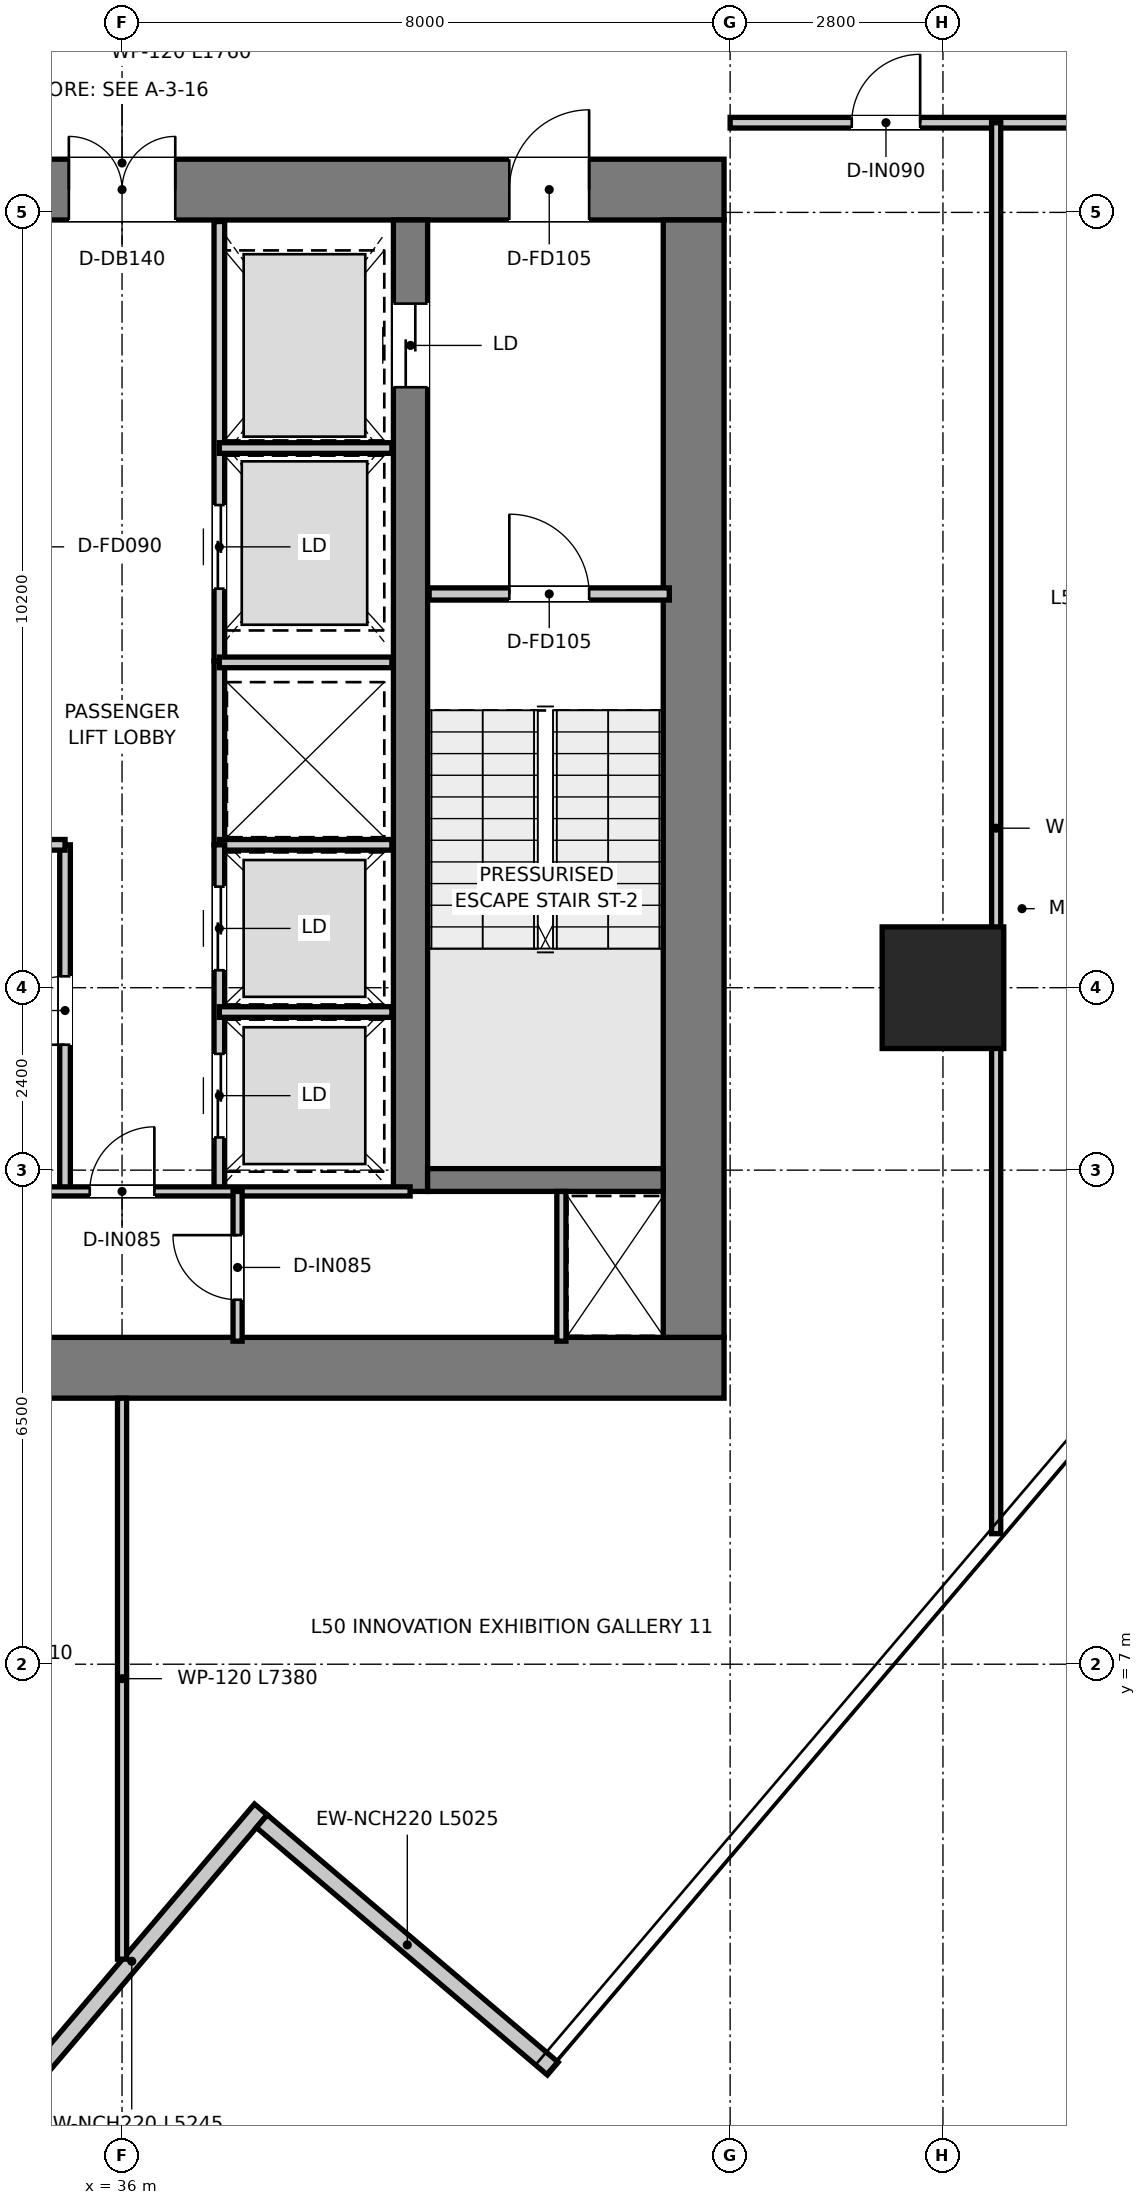
"""IFC4 building model, lengths in metres.
Left out: names, types, materials, properties, quantities, classifications, styles, units other than length and angle.
Written with IfcOpenShell. Run it as: python <this file> out.ifc"""

import sys

from ifc_helpers import new_model, si_unit, direction, frame, frame_2d, origin, origin_2d, place, context, subcontext, project, spatial, rectangle, extrude, source, transform, mapped, element, fill, save


model = new_model("IFC4")
c1 = context("Model", 3, precision=1e-05, world=origin(), true_north=direction((0.0, 1.0)))
c2 = subcontext(c1, "Body", "Model", "MODEL_VIEW")
j1 = project(units=[si_unit("LENGTHUNIT", "METRE"), si_unit("PLANEANGLEUNIT", "RADIAN")], contexts=[c1])
p1 = place(None, origin())
s1 = spatial("IfcSite", under=j1, at=p1, CompositionType="ELEMENT")
p2 = place(p1, origin())
s2 = spatial("IfcBuilding", under=s1, at=p2, CompositionType="ELEMENT")
p3 = place(p2, frame((0.0, 0.0, 207.3)))
s3 = spatial("IfcBuildingStorey", under=s2, at=p3, CompositionType="ELEMENT", Elevation=207.3)
p4 = place(p3, frame((28.08, 10.9, 0.0), z_axis=(0.0, 0.0, 1.0), x_axis=(1.0, 0.0, 0.0)))
e1 = element("IfcWall", 1, at=p4, inside=s3, PredefinedType="SHEAR", context=c2, shape_type="SweptSolid", body=[
    extrude(rectangle(XDim=15.84, YDim=0.8, at=frame_2d((7.92, 0.0))), origin(), (0.0, 0.0, 1.0), 3.95),
])
p5 = place(p3, frame((28.08, 26.4, 0.0), z_axis=(0.0, 0.0, 1.0), x_axis=(1.0, 0.0, 0.0)))
e2 = element("IfcWall", 2, at=p5, inside=s3, PredefinedType="SHEAR", context=c2, shape_type="SweptSolid", body=[
    extrude(rectangle(XDim=15.84, YDim=0.8, at=frame_2d((7.92, 0.0))), origin(), (0.0, 0.0, 1.0), 3.95),
])
p6 = place(p5, frame((7.22, 0.0, 0.0)))
e3 = element("IfcOpeningElement", 3, at=p6, cuts=e2, PredefinedType="OPENING", context=c2, shape_type="SweptSolid", body=[
    extrude(rectangle(XDim=1.4, YDim=2.2, at=frame_2d((0.7, 1.1))), frame((0.0, 0.41, 0.0), z_axis=(0.0, -1.0, 0.0), x_axis=(1.0, 0.0, 0.0)), (0.0, 0.0, 1.0), 0.82),
])
p7 = place(p5, frame((1.775, 0.0, 0.0)))
e4 = element("IfcOpeningElement", 4, at=p7, cuts=e2, PredefinedType="OPENING", context=c2, shape_type="SweptSolid", body=[
    extrude(rectangle(XDim=1.05, YDim=2.1, at=frame_2d((0.525, 1.05))), frame((0.0, 0.41, 0.0), z_axis=(0.0, -1.0, 0.0), x_axis=(1.0, 0.0, 0.0)), (0.0, 0.0, 1.0), 0.82),
])
p8 = place(p5, frame((13.015, 0.0, 0.0)))
e5 = element("IfcOpeningElement", 5, at=p8, cuts=e2, PredefinedType="OPENING", context=c2, shape_type="SweptSolid", body=[
    extrude(rectangle(XDim=1.05, YDim=2.1, at=frame_2d((0.525, 1.05))), frame((0.0, 0.41, 0.0), z_axis=(0.0, -1.0, 0.0), x_axis=(1.0, 0.0, 0.0)), (0.0, 0.0, 1.0), 0.82),
])
p9 = place(p3, frame((43.52, 11.3, 0.0), z_axis=(0.0, 0.0, 1.0), x_axis=(0.0, 1.0, 0.0)))
e6 = element("IfcWall", 6, at=p9, inside=s3, PredefinedType="SHEAR", context=c2, shape_type="SweptSolid", body=[
    extrude(rectangle(XDim=14.7, YDim=0.8, at=frame_2d((7.35, 0.0))), origin(), (0.0, 0.0, 1.0), 3.95),
])
p10 = place(p3, frame((39.795, 13.22, 0.0), z_axis=(0.0, 0.0, 1.0), x_axis=(0.0, 1.0, 0.0)))
e7 = element("IfcWall", 7, at=p10, inside=s3, PredefinedType="SHEAR", context=c2, shape_type="SweptSolid", body=[
    extrude(rectangle(XDim=12.78, YDim=0.45, at=frame_2d((6.39, 0.0))), origin(), (0.0, 0.0, 1.0), 3.95),
])
p11 = place(p10, frame((10.58, 0.0, 0.0)))
e8 = element("IfcOpeningElement", 8, at=p11, cuts=e7, PredefinedType="OPENING", context=c2, shape_type="SweptSolid", body=[
    extrude(rectangle(XDim=1.1, YDim=2.15, at=frame_2d((0.55, 1.075))), frame((0.0, 0.235, 0.0), z_axis=(0.0, -1.0, 0.0), x_axis=(1.0, 0.0, 0.0)), (0.0, 0.0, 1.0), 0.47),
])
p12 = place(p3, frame((40.02, 13.37, 0.0), z_axis=(0.0, 0.0, 1.0), x_axis=(1.0, 0.0, 0.0)))
e9 = element("IfcWall", 9, at=p12, inside=s3, PredefinedType="SHEAR", context=c2, shape_type="SweptSolid", body=[
    extrude(rectangle(XDim=3.1, YDim=0.3, at=frame_2d((1.55, 0.0))), origin(), (0.0, 0.0, 1.0), 3.95),
])
m1 = source(origin(), c2, "Body", "SweptSolid", [
    extrude(rectangle(XDim=1.6, YDim=1.6, at=origin_2d()), origin(), (0.0, 0.0, 1.0), 3.95),
])
p13 = place(p3, frame((46.8, 15.9, 0.0), z_axis=(0.0, 0.0, 1.0), x_axis=(1.0, 0.0, 0.0)))
e10 = element("IfcColumn", 10, at=p13, inside=s3, PredefinedType="USERDEFINED", context=c2, shape_type="MappedRepresentation", body=[
    mapped(m1, transform((0.0, 0.0, 0.0), x_axis=(1.0, 0.0, 0.0), y_axis=(0.0, 1.0, 0.0), z_axis=(0.0, 0.0, 1.0), scale=1.0)),
])
p14 = place(p3, frame((34.428, 1.094, 0.0), z_axis=(0.0, 0.0, 1.0), x_axis=(0.647807844474, 0.761803778304, 0.0)))
e11 = element("IfcWall", 11, at=p14, inside=s3, PredefinedType="ELEMENTEDWALL", context=c2, shape_type="SweptSolid", body=[
    extrude(rectangle(XDim=5.245, YDim=0.22, at=frame_2d((2.623, 0.0))), origin(), (0.0, 0.0, 1.0), 3.67),
])
p15 = place(p3, frame((37.839, 4.935, 0.0), z_axis=(0.0, 0.0, 1.0), x_axis=(0.761819427757, -0.647789440707, 0.0)))
e12 = element("IfcWall", 12, at=p15, inside=s3, PredefinedType="ELEMENTEDWALL", context=c2, shape_type="SweptSolid", body=[
    extrude(rectangle(XDim=5.025, YDim=0.22, at=frame_2d((2.512, 0.0))), origin(), (0.0, 0.0, 1.0), 3.67),
])
p16 = place(p3, frame((40.04, 21.08, 0.0), z_axis=(0.0, 0.0, 1.0), x_axis=(1.0, 0.0, 0.0)))
e13 = element("IfcWall", 13, at=p16, inside=s3, PredefinedType="PARTITIONING", context=c2, shape_type="SweptSolid", body=[
    extrude(rectangle(XDim=3.16, YDim=0.16, at=frame_2d((1.58, 0.0))), origin(), (0.0, 0.0, 1.0), 3.67),
])
p17 = place(p16, frame((1.055, 0.0, 0.0)))
e14 = element("IfcOpeningElement", 14, at=p17, cuts=e13, PredefinedType="OPENING", context=c2, shape_type="SweptSolid", body=[
    extrude(rectangle(XDim=1.05, YDim=2.1, at=frame_2d((0.525, 1.05))), frame((0.0, 0.09, 0.0), z_axis=(0.0, -1.0, 0.0), x_axis=(1.0, 0.0, 0.0)), (0.0, 0.0, 1.0), 0.18),
])
p18 = place(p3, frame((37.28, 20.2, 0.0), z_axis=(0.0, 0.0, 1.0), x_axis=(0.0, 1.0, 0.0)))
e15 = element("IfcWall", 15, at=p18, inside=s3, PredefinedType="PARTITIONING", context=c2, shape_type="SweptSolid", body=[
    extrude(rectangle(XDim=5.78, YDim=0.14, at=frame_2d((2.89, 0.0))), origin(), (0.0, 0.0, 1.0), 2.67),
])
p19 = place(p18, frame((0.95, 0.0, 0.0)))
e16 = element("IfcOpeningElement", 16, at=p19, cuts=e15, PredefinedType="OPENING", context=c2, shape_type="SweptSolid", body=[
    extrude(rectangle(XDim=1.1, YDim=2.15, at=frame_2d((0.55, 1.075))), frame((0.0, 0.08, 0.0), z_axis=(0.0, -1.0, 0.0), x_axis=(1.0, 0.0, 0.0)), (0.0, 0.0, 1.0), 0.16),
])
p20 = place(p3, frame((37.28, 23.0, 0.0), z_axis=(0.0, 0.0, 1.0), x_axis=(1.0, 0.0, 0.0)))
e17 = element("IfcWall", 17, at=p20, inside=s3, PredefinedType="PARTITIONING", context=c2, shape_type="SweptSolid", body=[
    extrude(rectangle(XDim=2.27, YDim=0.14, at=frame_2d((1.135, 0.0))), origin(), (0.0, 0.0, 1.0), 2.67),
])
p21 = place(p3, frame((37.28, 17.78, 0.0), z_axis=(0.0, 0.0, 1.0), x_axis=(0.0, 1.0, 0.0)))
e18 = element("IfcWall", 18, at=p21, inside=s3, PredefinedType="PARTITIONING", context=c2, shape_type="SweptSolid", body=[
    extrude(rectangle(XDim=2.42, YDim=0.14, at=frame_2d((1.21, 0.0))), origin(), (0.0, 0.0, 1.0), 3.67),
])
for number, where, z_axis, x_axis in (
    (19, (37.28, 17.78, 0.0), (0.0, 0.0, 1.0), (1.0, 0.0, 0.0)),
    (20, (37.28, 20.18, 0.0), (0.0, 0.0, 1.0), (1.0, 0.0, 0.0)),
):
    element("IfcWall", number, at=place(p3, frame(where, z_axis=z_axis, x_axis=x_axis)), inside=s3, PredefinedType="PARTITIONING", context=c2, shape_type="SweptSolid", body=[
        extrude(rectangle(XDim=2.27, YDim=0.14, at=frame_2d((1.135, 0.0))), origin(), (0.0, 0.0, 1.0), 3.67),
    ])
p22 = place(p3, frame((35.25, 13.22, 0.0), z_axis=(0.0, 0.0, 1.0), x_axis=(0.0, 1.0, 0.0)))
e21 = element("IfcWall", 21, at=p22, inside=s3, PredefinedType="PARTITIONING", context=c2, shape_type="SweptSolid", body=[
    extrude(rectangle(XDim=4.56, YDim=0.14, at=frame_2d((2.28, 0.0))), origin(), (0.0, 0.0, 1.0), 3.67),
])
p23 = place(p22, frame((1.93, 0.0, 0.0)))
e22 = element("IfcOpeningElement", 22, at=p23, cuts=e21, PredefinedType="OPENING", context=c2, shape_type="SweptSolid", body=[
    extrude(rectangle(XDim=0.9, YDim=2.1, at=frame_2d((0.45, 1.05))), frame((0.0, 0.08, 0.0), z_axis=(0.0, -1.0, 0.0), x_axis=(1.0, 0.0, 0.0)), (0.0, 0.0, 1.0), 0.16),
])
p24 = place(p3, frame((34.72, 17.78, 0.0), z_axis=(0.0, 0.0, 1.0), x_axis=(1.0, 0.0, 0.0)))
e23 = element("IfcWall", 23, at=p24, inside=s3, PredefinedType="PARTITIONING", context=c2, shape_type="SweptSolid", body=[
    extrude(rectangle(XDim=0.53, YDim=0.14, at=frame_2d((0.265, 0.0))), origin(), (0.0, 0.0, 1.0), 3.67),
])
p25 = place(p3, frame((37.28, 13.22, 0.0), z_axis=(0.0, 0.0, 1.0), x_axis=(0.0, 1.0, 0.0)))
e24 = element("IfcWall", 24, at=p25, inside=s3, PredefinedType="PARTITIONING", context=c2, shape_type="SweptSolid", body=[
    extrude(rectangle(XDim=4.56, YDim=0.14, at=frame_2d((2.28, 0.0))), origin(), (0.0, 0.0, 1.0), 3.67),
])
p26 = place(p25, frame((0.71, 0.0, 0.0)))
e25 = element("IfcOpeningElement", 25, at=p26, cuts=e24, PredefinedType="OPENING", context=c2, shape_type="SweptSolid", body=[
    extrude(rectangle(XDim=1.1, YDim=2.15, at=frame_2d((0.55, 1.075))), frame((0.0, 0.08, 0.0), z_axis=(0.0, -1.0, 0.0), x_axis=(1.0, 0.0, 0.0)), (0.0, 0.0, 1.0), 0.16),
])
p27 = place(p25, frame((2.91, 0.0, 0.0)))
e26 = element("IfcOpeningElement", 26, at=p27, cuts=e24, PredefinedType="OPENING", context=c2, shape_type="SweptSolid", body=[
    extrude(rectangle(XDim=1.1, YDim=2.15, at=frame_2d((0.55, 1.075))), frame((0.0, 0.08, 0.0), z_axis=(0.0, -1.0, 0.0), x_axis=(1.0, 0.0, 0.0)), (0.0, 0.0, 1.0), 0.16),
])
p28 = place(p3, frame((37.28, 15.58, 0.0), z_axis=(0.0, 0.0, 1.0), x_axis=(1.0, 0.0, 0.0)))
e27 = element("IfcWall", 27, at=p28, inside=s3, PredefinedType="PARTITIONING", context=c2, shape_type="SweptSolid", body=[
    extrude(rectangle(XDim=2.27, YDim=0.14, at=frame_2d((1.135, 0.0))), origin(), (0.0, 0.0, 1.0), 3.67),
])
p29 = place(p3, frame((41.78, 11.25, 0.0), z_axis=(0.0, 0.0, 1.0), x_axis=(0.0, 1.0, 0.0)))
e28 = element("IfcWall", 28, at=p29, inside=s3, PredefinedType="PARTITIONING", context=c2, shape_type="SweptSolid", body=[
    extrude(rectangle(XDim=1.97, YDim=0.12, at=frame_2d((0.985, 0.0))), origin(), (0.0, 0.0, 1.0), 3.67),
])
p30 = place(p3, frame((32.21, 13.22, 0.0), z_axis=(0.0, 0.0, 1.0), x_axis=(1.0, 0.0, 0.0)))
e29 = element("IfcWall", 29, at=p30, inside=s3, PredefinedType="PARTITIONING", context=c2, shape_type="SweptSolid", body=[
    extrude(rectangle(XDim=7.58, YDim=0.12, at=frame_2d((3.79, 0.0))), origin(), (0.0, 0.0, 1.0), 3.67),
])
p31 = place(p30, frame((3.365, 0.0, 0.0)))
e30 = element("IfcOpeningElement", 30, at=p31, cuts=e29, PredefinedType="OPENING", context=c2, shape_type="SweptSolid", body=[
    extrude(rectangle(XDim=0.85, YDim=2.1, at=frame_2d((0.425, 1.05))), frame((0.0, 0.07, 0.0), z_axis=(0.0, -1.0, 0.0), x_axis=(1.0, 0.0, 0.0)), (0.0, 0.0, 1.0), 0.14),
])
p32 = place(p3, frame((37.52, 11.25, 0.0), z_axis=(0.0, 0.0, 1.0), x_axis=(0.0, 1.0, 0.0)))
e31 = element("IfcWall", 31, at=p32, inside=s3, PredefinedType="PARTITIONING", context=c2, shape_type="SweptSolid", body=[
    extrude(rectangle(XDim=1.97, YDim=0.12, at=frame_2d((0.985, 0.0))), origin(), (0.0, 0.0, 1.0), 3.67),
])
p33 = place(p32, frame((0.545, 0.0, 0.0)))
e32 = element("IfcOpeningElement", 32, at=p33, cuts=e31, PredefinedType="OPENING", context=c2, shape_type="SweptSolid", body=[
    extrude(rectangle(XDim=0.85, YDim=2.1, at=frame_2d((0.425, 1.05))), frame((0.0, 0.07, 0.0), z_axis=(0.0, -1.0, 0.0), x_axis=(1.0, 0.0, 0.0)), (0.0, 0.0, 1.0), 0.14),
])
p34 = place(p3, frame((44.0, 27.28, 0.0), z_axis=(0.0, 0.0, 1.0), x_axis=(1.0, 0.0, 0.0)))
e33 = element("IfcWall", 33, at=p34, inside=s3, PredefinedType="PARTITIONING", context=c2, shape_type="SweptSolid", body=[
    extrude(rectangle(XDim=14.898, YDim=0.14, at=frame_2d((7.449, 0.0))), origin(), (0.0, 0.0, 1.0), 3.03),
])
p35 = place(p34, frame((1.6, 0.0, 0.0)))
e34 = element("IfcOpeningElement", 34, at=p35, cuts=e33, PredefinedType="OPENING", context=c2, shape_type="SweptSolid", body=[
    extrude(rectangle(XDim=0.9, YDim=2.1, at=frame_2d((0.45, 1.05))), frame((0.0, 0.08, 0.0), z_axis=(0.0, -1.0, 0.0), x_axis=(1.0, 0.0, 0.0)), (0.0, 0.0, 1.0), 0.16),
])
p36 = place(p34, frame((4.75, 0.0, 0.0)))
e35 = element("IfcOpeningElement", 35, at=p36, cuts=e33, PredefinedType="OPENING", context=c2, shape_type="SweptSolid", body=[
    extrude(rectangle(XDim=0.9, YDim=2.1, at=frame_2d((0.45, 1.05))), frame((0.0, 0.08, 0.0), z_axis=(0.0, -1.0, 0.0), x_axis=(1.0, 0.0, 0.0)), (0.0, 0.0, 1.0), 0.16),
])
p37 = place(p34, frame((12.124, 0.0, 0.0)))
e36 = element("IfcOpeningElement", 36, at=p37, cuts=e33, PredefinedType="OPENING", context=c2, shape_type="SweptSolid", body=[
    extrude(rectangle(XDim=0.9, YDim=2.1, at=frame_2d((0.45, 1.05))), frame((0.0, 0.08, 0.0), z_axis=(0.0, -1.0, 0.0), x_axis=(1.0, 0.0, 0.0)), (0.0, 0.0, 1.0), 0.16),
])
p38 = place(p3, frame((36.0, 3.12, 0.0), z_axis=(0.0, 0.0, 1.0), x_axis=(0.0, 1.0, 0.0)))
e37 = element("IfcWall", 37, at=p38, inside=s3, PredefinedType="PARTITIONING", context=c2, shape_type="SweptSolid", body=[
    extrude(rectangle(XDim=7.38, YDim=0.12, at=frame_2d((3.69, 0.0))), origin(), (0.0, 0.0, 1.0), 3.67),
])
p39 = place(p3, frame((47.5, 8.717, 0.0), z_axis=(0.0, 0.0, 1.0), x_axis=(0.0, 1.0, 0.0)))
e38 = element("IfcWall", 38, at=p39, inside=s3, PredefinedType="PARTITIONING", context=c2, shape_type="SweptSolid", body=[
    extrude(rectangle(XDim=18.563, YDim=0.12, at=frame_2d((9.281, 0.0))), origin(), (0.0, 0.0, 1.0), 3.18),
])
p40 = place(p17, origin())
e39 = element("IfcDoor", 39, at=p40, inside=s3, OperationType="SINGLE_SWING_LEFT", PredefinedType="DOOR", context=c2, shape_type="SweptSolid", body=[
    extrude(rectangle(XDim=1.05, YDim=2.1, at=frame_2d((0.525, 1.05))), frame((0.0, 0.025, 0.0), z_axis=(0.0, -1.0, 0.0), x_axis=(1.0, 0.0, 0.0)), (0.0, 0.0, 1.0), 0.05),
])
fill(e14, e39)
p41 = place(p6, origin())
e40 = element("IfcDoor", 40, at=p41, inside=s3, OperationType="DOUBLE_DOOR_SINGLE_SWING", PredefinedType="DOOR", context=c2, shape_type="SweptSolid", body=[
    extrude(rectangle(XDim=1.4, YDim=2.2, at=frame_2d((0.7, 1.1))), frame((0.0, 0.025, 0.0), z_axis=(0.0, -1.0, 0.0), x_axis=(1.0, 0.0, 0.0)), (0.0, 0.0, 1.0), 0.05),
])
fill(e3, e40)
p42 = place(p8, origin())
e41 = element("IfcDoor", 41, at=p42, inside=s3, OperationType="SINGLE_SWING_RIGHT", PredefinedType="DOOR", context=c2, shape_type="SweptSolid", body=[
    extrude(rectangle(XDim=1.05, YDim=2.1, at=frame_2d((0.525, 1.05))), frame((0.0, 0.025, 0.0), z_axis=(0.0, -1.0, 0.0), x_axis=(1.0, 0.0, 0.0)), (0.0, 0.0, 1.0), 0.05),
])
fill(e5, e41)
p43 = place(p11, origin())
e42 = element("IfcDoor", 42, at=p43, inside=s3, OperationType="DOUBLE_DOOR_SLIDING", PredefinedType="DOOR", context=c2, shape_type="SweptSolid", body=[
    extrude(rectangle(XDim=1.1, YDim=2.15, at=frame_2d((0.55, 1.075))), frame((0.0, 0.025, 0.0), z_axis=(0.0, -1.0, 0.0), x_axis=(1.0, 0.0, 0.0)), (0.0, 0.0, 1.0), 0.05),
])
fill(e8, e42)
p44 = place(p19, origin())
e43 = element("IfcDoor", 43, at=p44, inside=s3, OperationType="DOUBLE_DOOR_SLIDING", PredefinedType="DOOR", context=c2, shape_type="SweptSolid", body=[
    extrude(rectangle(XDim=1.1, YDim=2.15, at=frame_2d((0.55, 1.075))), frame((0.0, 0.025, 0.0), z_axis=(0.0, -1.0, 0.0), x_axis=(1.0, 0.0, 0.0)), (0.0, 0.0, 1.0), 0.05),
])
fill(e16, e43)
p45 = place(p23, origin())
e44 = element("IfcDoor", 44, at=p45, inside=s3, OperationType="SINGLE_SWING_LEFT", PredefinedType="DOOR", context=c2, shape_type="SweptSolid", body=[
    extrude(rectangle(XDim=0.9, YDim=2.1, at=frame_2d((0.45, 1.05))), frame((0.0, 0.025, 0.0), z_axis=(0.0, -1.0, 0.0), x_axis=(1.0, 0.0, 0.0)), (0.0, 0.0, 1.0), 0.05),
])
fill(e22, e44)
p46 = place(p26, origin())
e45 = element("IfcDoor", 45, at=p46, inside=s3, OperationType="DOUBLE_DOOR_SLIDING", PredefinedType="DOOR", context=c2, shape_type="SweptSolid", body=[
    extrude(rectangle(XDim=1.1, YDim=2.15, at=frame_2d((0.55, 1.075))), frame((0.0, 0.025, 0.0), z_axis=(0.0, -1.0, 0.0), x_axis=(1.0, 0.0, 0.0)), (0.0, 0.0, 1.0), 0.05),
])
fill(e25, e45)
p47 = place(p27, origin())
e46 = element("IfcDoor", 46, at=p47, inside=s3, OperationType="DOUBLE_DOOR_SLIDING", PredefinedType="DOOR", context=c2, shape_type="SweptSolid", body=[
    extrude(rectangle(XDim=1.1, YDim=2.15, at=frame_2d((0.55, 1.075))), frame((0.0, 0.025, 0.0), z_axis=(0.0, -1.0, 0.0), x_axis=(1.0, 0.0, 0.0)), (0.0, 0.0, 1.0), 0.05),
])
fill(e26, e46)
p48 = place(p31, origin())
e47 = element("IfcDoor", 47, at=p48, inside=s3, OperationType="SINGLE_SWING_RIGHT", PredefinedType="DOOR", context=c2, shape_type="SweptSolid", body=[
    extrude(rectangle(XDim=0.85, YDim=2.1, at=frame_2d((0.425, 1.05))), frame((0.0, 0.025, 0.0), z_axis=(0.0, -1.0, 0.0), x_axis=(1.0, 0.0, 0.0)), (0.0, 0.0, 1.0), 0.05),
])
fill(e30, e47)
p49 = place(p33, origin())
e48 = element("IfcDoor", 48, at=p49, inside=s3, OperationType="SINGLE_SWING_RIGHT", PredefinedType="DOOR", context=c2, shape_type="SweptSolid", body=[
    extrude(rectangle(XDim=0.85, YDim=2.1, at=frame_2d((0.425, 1.05))), frame((0.0, 0.025, 0.0), z_axis=(0.0, -1.0, 0.0), x_axis=(1.0, 0.0, 0.0)), (0.0, 0.0, 1.0), 0.05),
])
fill(e32, e48)
p50 = place(p35, origin())
e49 = element("IfcDoor", 49, at=p50, inside=s3, OperationType="SINGLE_SWING_RIGHT", PredefinedType="DOOR", context=c2, shape_type="SweptSolid", body=[
    extrude(rectangle(XDim=0.9, YDim=2.1, at=frame_2d((0.45, 1.05))), frame((0.0, 0.025, 0.0), z_axis=(0.0, -1.0, 0.0), x_axis=(1.0, 0.0, 0.0)), (0.0, 0.0, 1.0), 0.05),
])
fill(e34, e49)
save(model, sys.argv[1])
